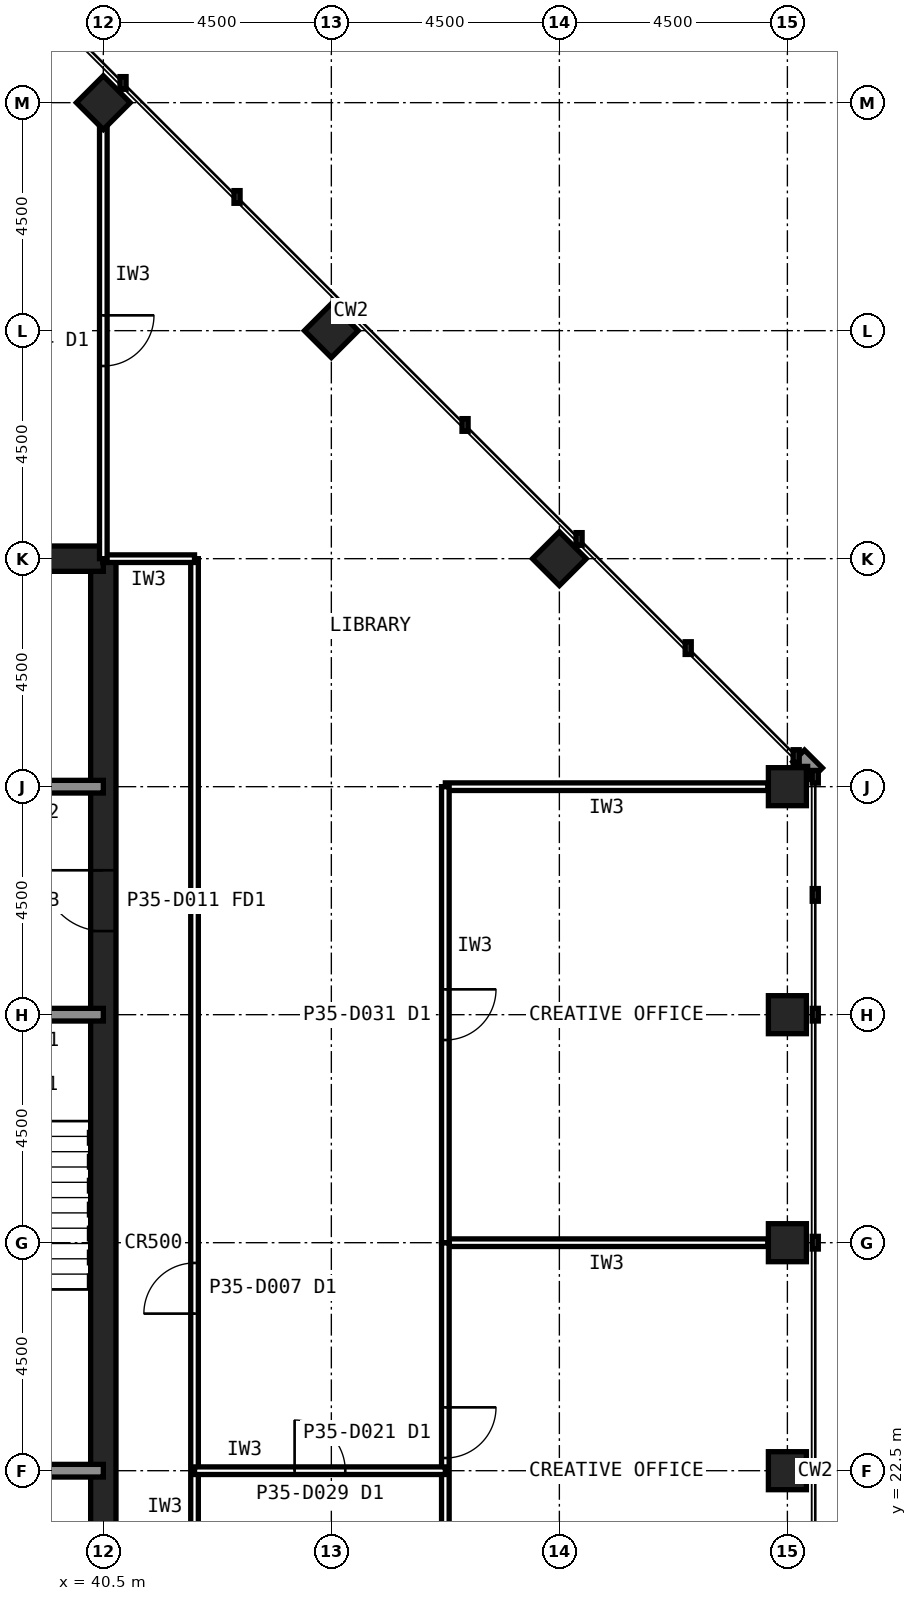
"""IFC4 building model, lengths in metres.
Left out: names, types, materials, properties, quantities, classifications, styles, units other than length and angle.
Written with IfcOpenShell. Run it as: python <this file> out.ifc"""

import sys

from ifc_helpers import new_model, si_unit, direction, frame, frame_2d, origin, origin_2d, place, context, subcontext, project, spatial, rectangle, hollow_rectangle, extrude, element, fill, save


model = new_model("IFC4")
c1 = context("Model", 3, precision=1e-05, world=origin(), true_north=direction((0.0, 1.0)))
c2 = subcontext(c1, "Body", "Model", "MODEL_VIEW")
j1 = project(units=[si_unit("LENGTHUNIT", "METRE"), si_unit("PLANEANGLEUNIT", "RADIAN")], contexts=[c1])
p1 = place(None, origin())
s1 = spatial("IfcSite", under=j1, at=p1, CompositionType="ELEMENT")
p2 = place(p1, origin())
s2 = spatial("IfcBuilding", under=s1, at=p2, CompositionType="ELEMENT")
p3 = place(p2, frame((0.0, 0.0, 151.6)))
s3 = spatial("IfcBuildingStorey", under=s2, at=p3, CompositionType="ELEMENT", Elevation=151.6)
for number, where, z_axis, x_axis in (
    (1, (54.0, 22.5, 0.0), (0.0, 0.0, 1.0), (1.0, 0.0, 0.0)),
    (2, (54.0, 27.0, 0.0), (0.0, 0.0, 1.0), (1.0, 0.0, 0.0)),
    (3, (54.0, 31.5, 0.0), (0.0, 0.0, 1.0), (1.0, 0.0, 0.0)),
    (4, (54.0, 36.0, 0.0), (0.0, 0.0, 1.0), (1.0, 0.0, 0.0)),
    (5, (49.5, 40.5, 0.0), (0.0, 0.0, 1.0), (0.707, 0.707, 0.0)),
    (6, (45.0, 45.0, 0.0), (0.0, 0.0, 1.0), (0.707, 0.707, 0.0)),
    (7, (40.5, 49.5, 0.0), (0.0, 0.0, 1.0), (0.707, 0.707, 0.0)),
):
    element("IfcColumn", number, at=place(p3, frame(where, z_axis=z_axis, x_axis=x_axis)), inside=s3, PredefinedType="COLUMN", context=c2, shape_type="SweptSolid", body=[
        extrude(hollow_rectangle(XDim=0.75, YDim=0.75, WallThickness=0.04, at=origin_2d()), origin(), (0.0, 0.0, 1.0), 4.0),
    ])
p4 = place(p3, frame((40.5, 13.5, 0.0), z_axis=(0.0, 0.0, 1.0), x_axis=(0.0, 1.0, 0.0)))
e8 = element("IfcWall", 8, at=p4, inside=s3, PredefinedType="SHEAR", context=c2, shape_type="SweptSolid", body=[
    extrude(rectangle(XDim=27.0, YDim=0.5, at=frame_2d((13.5, 0.0))), origin(), (0.0, 0.0, 1.0), 4.0),
])
p5 = place(p4, frame((5.85, 0.0, 0.0)))
e9 = element("IfcOpeningElement", 9, at=p5, cuts=e8, PredefinedType="OPENING", context=c2, shape_type="SweptSolid", body=[
    extrude(rectangle(XDim=1.8, YDim=2.1, at=frame_2d((0.9, 1.05))), frame((0.0, 0.26, 0.0), z_axis=(0.0, -1.0, 0.0), x_axis=(1.0, 0.0, 0.0)), (0.0, 0.0, 1.0), 0.52),
])
p6 = place(p4, frame((19.65, 0.0, 0.0)))
e10 = element("IfcOpeningElement", 10, at=p6, cuts=e8, PredefinedType="OPENING", context=c2, shape_type="SweptSolid", body=[
    extrude(rectangle(XDim=1.2, YDim=2.1, at=frame_2d((0.6, 1.05))), frame((0.0, 0.26, 0.0), z_axis=(0.0, -1.0, 0.0), x_axis=(1.0, 0.0, 0.0)), (0.0, 0.0, 1.0), 0.52),
])
p7 = place(p3, frame((40.5, 40.5, 0.0), z_axis=(0.0, 0.0, 1.0), x_axis=(-1.0, 0.0, 0.0)))
e11 = element("IfcWall", 11, at=p7, inside=s3, PredefinedType="SHEAR", context=c2, shape_type="SweptSolid", body=[
    extrude(rectangle(XDim=27.0, YDim=0.5, at=frame_2d((13.5, 0.0))), origin(), (0.0, 0.0, 1.0), 4.0),
])
p8 = place(p3, frame((13.5, 36.0, 0.0), z_axis=(0.0, 0.0, 1.0), x_axis=(1.0, 0.0, 0.0)))
e12 = element("IfcWall", 12, at=p8, inside=s3, PredefinedType="SOLIDWALL", context=c2, shape_type="SweptSolid", body=[
    extrude(rectangle(XDim=27.0, YDim=0.25, at=frame_2d((13.5, 0.0))), origin(), (0.0, 0.0, 1.0), 3.84),
])
p9 = place(p8, frame((1.8, 0.0, 0.0)))
e13 = element("IfcOpeningElement", 13, at=p9, cuts=e12, PredefinedType="OPENING", context=c2, shape_type="SweptSolid", body=[
    extrude(rectangle(XDim=0.9, YDim=2.1, at=frame_2d((0.45, 1.05))), frame((0.0, 0.135, 0.0), z_axis=(0.0, -1.0, 0.0), x_axis=(1.0, 0.0, 0.0)), (0.0, 0.0, 1.0), 0.27),
])
p10 = place(p8, frame((5.55, 0.0, 0.0)))
e14 = element("IfcOpeningElement", 14, at=p10, cuts=e12, PredefinedType="OPENING", context=c2, shape_type="SweptSolid", body=[
    extrude(rectangle(XDim=0.9, YDim=2.1, at=frame_2d((0.45, 1.05))), frame((0.0, 0.135, 0.0), z_axis=(0.0, -1.0, 0.0), x_axis=(1.0, 0.0, 0.0)), (0.0, 0.0, 1.0), 0.27),
])
p11 = place(p8, frame((8.55, 0.0, 0.0)))
e15 = element("IfcOpeningElement", 15, at=p11, cuts=e12, PredefinedType="OPENING", context=c2, shape_type="SweptSolid", body=[
    extrude(rectangle(XDim=0.9, YDim=2.1, at=frame_2d((0.45, 1.05))), frame((0.0, 0.135, 0.0), z_axis=(0.0, -1.0, 0.0), x_axis=(1.0, 0.0, 0.0)), (0.0, 0.0, 1.0), 0.27),
])
p12 = place(p8, frame((24.1, 0.0, 0.0)))
e16 = element("IfcOpeningElement", 16, at=p12, cuts=e12, PredefinedType="OPENING", context=c2, shape_type="SweptSolid", body=[
    extrude(rectangle(XDim=1.3, YDim=2.2, at=frame_2d((0.65, 1.1))), frame((0.0, 0.135, 0.0), z_axis=(0.0, -1.0, 0.0), x_axis=(1.0, 0.0, 0.0)), (0.0, 0.0, 1.0), 0.27),
])
p13 = place(p3, frame((13.5, 22.5, 0.0), z_axis=(0.0, 0.0, 1.0), x_axis=(1.0, 0.0, 0.0)))
e17 = element("IfcWall", 17, at=p13, inside=s3, PredefinedType="SOLIDWALL", context=c2, shape_type="SweptSolid", body=[
    extrude(rectangle(XDim=27.0, YDim=0.25, at=frame_2d((13.5, 0.0))), origin(), (0.0, 0.0, 1.0), 3.84),
])
p14 = place(p13, frame((1.65, 0.0, 0.0)))
e18 = element("IfcOpeningElement", 18, at=p14, cuts=e17, PredefinedType="OPENING", context=c2, shape_type="SweptSolid", body=[
    extrude(rectangle(XDim=1.2, YDim=2.1, at=frame_2d((0.6, 1.05))), frame((0.0, 0.135, 0.0), z_axis=(0.0, -1.0, 0.0), x_axis=(1.0, 0.0, 0.0)), (0.0, 0.0, 1.0), 0.27),
])
p15 = place(p13, frame((6.025, 0.0, 0.0)))
e19 = element("IfcOpeningElement", 19, at=p15, cuts=e17, PredefinedType="OPENING", context=c2, shape_type="SweptSolid", body=[
    extrude(rectangle(XDim=1.0, YDim=2.1, at=frame_2d((0.5, 1.05))), frame((0.0, 0.135, 0.0), z_axis=(0.0, -1.0, 0.0), x_axis=(1.0, 0.0, 0.0)), (0.0, 0.0, 1.0), 0.27),
])
p16 = place(p13, frame((10.525, 0.0, 0.0)))
e20 = element("IfcOpeningElement", 20, at=p16, cuts=e17, PredefinedType="OPENING", context=c2, shape_type="SweptSolid", body=[
    extrude(rectangle(XDim=1.0, YDim=2.1, at=frame_2d((0.5, 1.05))), frame((0.0, 0.135, 0.0), z_axis=(0.0, -1.0, 0.0), x_axis=(1.0, 0.0, 0.0)), (0.0, 0.0, 1.0), 0.27),
])
p17 = place(p13, frame((19.75, 0.0, 0.0)))
e21 = element("IfcOpeningElement", 21, at=p17, cuts=e17, PredefinedType="OPENING", context=c2, shape_type="SweptSolid", body=[
    extrude(rectangle(XDim=1.0, YDim=2.1, at=frame_2d((0.5, 1.05))), frame((0.0, 0.135, 0.0), z_axis=(0.0, -1.0, 0.0), x_axis=(1.0, 0.0, 0.0)), (0.0, 0.0, 1.0), 0.27),
])
p18 = place(p13, frame((15.05, 0.0, 0.0)))
e22 = element("IfcOpeningElement", 22, at=p18, cuts=e17, PredefinedType="OPENING", context=c2, shape_type="SweptSolid", body=[
    extrude(rectangle(XDim=1.4, YDim=2.4, at=frame_2d((0.7, 1.2))), frame((0.0, 0.135, 0.0), z_axis=(0.0, -1.0, 0.0), x_axis=(1.0, 0.0, 0.0)), (0.0, 0.0, 1.0), 0.27),
])
p19 = place(p3, frame((13.5, 31.5, 0.0), z_axis=(0.0, 0.0, 1.0), x_axis=(1.0, 0.0, 0.0)))
e23 = element("IfcWall", 23, at=p19, inside=s3, PredefinedType="SOLIDWALL", context=c2, shape_type="SweptSolid", body=[
    extrude(rectangle(XDim=27.0, YDim=0.25, at=frame_2d((13.5, 0.0))), origin(), (0.0, 0.0, 1.0), 3.84),
])
p20 = place(p19, frame((24.15, 0.0, 0.0)))
e24 = element("IfcOpeningElement", 24, at=p20, cuts=e23, PredefinedType="OPENING", context=c2, shape_type="SweptSolid", body=[
    extrude(rectangle(XDim=1.2, YDim=2.1, at=frame_2d((0.6, 1.05))), frame((0.0, 0.135, 0.0), z_axis=(0.0, -1.0, 0.0), x_axis=(1.0, 0.0, 0.0)), (0.0, 0.0, 1.0), 0.27),
])
p21 = place(p19, frame((15.3, 0.0, 0.0)))
e25 = element("IfcOpeningElement", 25, at=p21, cuts=e23, PredefinedType="OPENING", context=c2, shape_type="SweptSolid", body=[
    extrude(rectangle(XDim=0.9, YDim=2.1, at=frame_2d((0.45, 1.05))), frame((0.0, 0.135, 0.0), z_axis=(0.0, -1.0, 0.0), x_axis=(1.0, 0.0, 0.0)), (0.0, 0.0, 1.0), 0.27),
])
p22 = place(p19, frame((19.8, 0.0, 0.0)))
e26 = element("IfcOpeningElement", 26, at=p22, cuts=e23, PredefinedType="OPENING", context=c2, shape_type="SweptSolid", body=[
    extrude(rectangle(XDim=0.9, YDim=2.1, at=frame_2d((0.45, 1.05))), frame((0.0, 0.135, 0.0), z_axis=(0.0, -1.0, 0.0), x_axis=(1.0, 0.0, 0.0)), (0.0, 0.0, 1.0), 0.27),
])
p23 = place(p3, frame((42.3, 11.7, 0.0), z_axis=(0.0, 0.0, 1.0), x_axis=(0.0, 1.0, 0.0)))
e27 = element("IfcWall", 27, at=p23, inside=s3, PredefinedType="PARTITIONING", context=c2, shape_type="SweptSolid", body=[
    extrude(rectangle(XDim=28.8, YDim=0.15, at=frame_2d((14.4, 0.0))), origin(), (0.0, 0.0, 1.0), 3.84),
])
p24 = place(p23, frame((13.9, 0.0, 0.0)))
e28 = element("IfcOpeningElement", 28, at=p24, cuts=e27, PredefinedType="OPENING", context=c2, shape_type="SweptSolid", body=[
    extrude(rectangle(XDim=1.0, YDim=2.1, at=frame_2d((0.5, 1.05))), frame((0.0, 0.085, 0.0), z_axis=(0.0, -1.0, 0.0), x_axis=(1.0, 0.0, 0.0)), (0.0, 0.0, 1.0), 0.17),
])
p25 = place(p3, frame((42.3, 40.5, 0.0), z_axis=(0.0, 0.0, 1.0), x_axis=(-1.0, 0.0, 0.0)))
e29 = element("IfcWall", 29, at=p25, inside=s3, PredefinedType="PARTITIONING", context=c2, shape_type="SweptSolid", body=[
    extrude(rectangle(XDim=1.81, YDim=0.15, at=frame_2d((0.905, 0.0))), origin(), (0.0, 0.0, 1.0), 2.989),
])
p26 = place(p3, frame((53.615, 27.0, 0.0), z_axis=(0.0, 0.0, 1.0), x_axis=(-1.0, 0.0, 0.0)))
e30 = element("IfcWall", 30, at=p26, inside=s3, PredefinedType="PARTITIONING", context=c2, shape_type="SweptSolid", body=[
    extrude(rectangle(XDim=6.365, YDim=0.15, at=frame_2d((3.183, 0.0))), origin(), (0.0, 0.0, 1.0), 2.989),
])
p27 = place(p3, frame((47.25, 27.0, 0.0), z_axis=(0.0, 0.0, 1.0), x_axis=(0.0, -1.0, 0.0)))
e31 = element("IfcWall", 31, at=p27, inside=s3, PredefinedType="PARTITIONING", context=c2, shape_type="SweptSolid", body=[
    extrude(rectangle(XDim=9.0, YDim=0.15, at=frame_2d((4.5, 0.0))), origin(), (0.0, 0.0, 1.0), 3.84),
])
p28 = place(p27, frame((3.25, 0.0, 0.0)))
e32 = element("IfcOpeningElement", 32, at=p28, cuts=e31, PredefinedType="OPENING", context=c2, shape_type="SweptSolid", body=[
    extrude(rectangle(XDim=1.0, YDim=2.1, at=frame_2d((0.5, 1.05))), frame((0.0, 0.085, 0.0), z_axis=(0.0, -1.0, 0.0), x_axis=(1.0, 0.0, 0.0)), (0.0, 0.0, 1.0), 0.17),
])
p29 = place(p3, frame((53.615, 36.0, 0.0), z_axis=(0.0, 0.0, 1.0), x_axis=(-1.0, 0.0, 0.0)))
e33 = element("IfcWall", 33, at=p29, inside=s3, PredefinedType="PARTITIONING", context=c2, shape_type="SweptSolid", body=[
    extrude(rectangle(XDim=6.365, YDim=0.15, at=frame_2d((3.183, 0.0))), origin(), (0.0, 0.0, 1.0), 2.989),
])
p30 = place(p3, frame((47.25, 36.0, 0.0), z_axis=(0.0, 0.0, 1.0), x_axis=(0.0, -1.0, 0.0)))
e34 = element("IfcWall", 34, at=p30, inside=s3, PredefinedType="PARTITIONING", context=c2, shape_type="SweptSolid", body=[
    extrude(rectangle(XDim=9.0, YDim=0.15, at=frame_2d((4.5, 0.0))), origin(), (0.0, 0.0, 1.0), 3.84),
])
p31 = place(p30, frame((4.0, 0.0, 0.0)))
e35 = element("IfcOpeningElement", 35, at=p31, cuts=e34, PredefinedType="OPENING", context=c2, shape_type="SweptSolid", body=[
    extrude(rectangle(XDim=1.0, YDim=2.1, at=frame_2d((0.5, 1.05))), frame((0.0, 0.085, 0.0), z_axis=(0.0, -1.0, 0.0), x_axis=(1.0, 0.0, 0.0)), (0.0, 0.0, 1.0), 0.17),
])
p32 = place(p3, frame((40.5, 49.105, 0.0), z_axis=(0.0, 0.0, 1.0), x_axis=(0.0, -1.0, 0.0)))
e36 = element("IfcWall", 36, at=p32, inside=s3, PredefinedType="PARTITIONING", context=c2, shape_type="SweptSolid", body=[
    extrude(rectangle(XDim=8.605, YDim=0.15, at=frame_2d((4.302, 0.0))), origin(), (0.0, 0.0, 1.0), 2.989),
])
p33 = place(p32, frame((3.802, 0.0, 0.0)))
e37 = element("IfcOpeningElement", 37, at=p33, cuts=e36, PredefinedType="OPENING", context=c2, shape_type="SweptSolid", body=[
    extrude(rectangle(XDim=1.0, YDim=2.1, at=frame_2d((0.5, 1.05))), frame((0.0, 0.085, 0.0), z_axis=(0.0, -1.0, 0.0), x_axis=(1.0, 0.0, 0.0)), (0.0, 0.0, 1.0), 0.17),
])
p34 = place(p3, frame((42.3, 22.5, 0.0), z_axis=(0.0, 0.0, 1.0), x_axis=(1.0, 0.0, 0.0)))
e38 = element("IfcWall", 38, at=p34, inside=s3, PredefinedType="PARTITIONING", context=c2, shape_type="SweptSolid", body=[
    extrude(rectangle(XDim=4.95, YDim=0.15, at=frame_2d((2.475, 0.0))), origin(), (0.0, 0.0, 1.0), 2.989),
])
p35 = place(p34, frame((1.975, 0.0, 0.0)))
e39 = element("IfcOpeningElement", 39, at=p35, cuts=e38, PredefinedType="OPENING", context=c2, shape_type="SweptSolid", body=[
    extrude(rectangle(XDim=1.0, YDim=2.1, at=frame_2d((0.5, 1.05))), frame((0.0, 0.085, 0.0), z_axis=(0.0, -1.0, 0.0), x_axis=(1.0, 0.0, 0.0)), (0.0, 0.0, 1.0), 0.17),
])
p36 = place(p6, origin())
e40 = element("IfcDoor", 40, at=p36, inside=s3, OperationType="SINGLE_SWING_RIGHT", PredefinedType="DOOR", context=c2, shape_type="SweptSolid", body=[
    extrude(rectangle(XDim=1.2, YDim=2.1, at=frame_2d((0.6, 1.05))), frame((0.0, 0.025, 0.0), z_axis=(0.0, -1.0, 0.0), x_axis=(1.0, 0.0, 0.0)), (0.0, 0.0, 1.0), 0.05),
])
fill(e10, e40)
p37 = place(p24, origin())
e41 = element("IfcDoor", 41, at=p37, inside=s3, OperationType="SINGLE_SWING_LEFT", PredefinedType="DOOR", context=c2, shape_type="SweptSolid", body=[
    extrude(rectangle(XDim=1.0, YDim=2.1, at=frame_2d((0.5, 1.05))), frame((0.0, 0.025, 0.0), z_axis=(0.0, -1.0, 0.0), x_axis=(1.0, 0.0, 0.0)), (0.0, 0.0, 1.0), 0.05),
])
fill(e28, e41)
p38 = place(p28, origin())
e42 = element("IfcDoor", 42, at=p38, inside=s3, OperationType="SINGLE_SWING_LEFT", PredefinedType="DOOR", context=c2, shape_type="SweptSolid", body=[
    extrude(rectangle(XDim=1.0, YDim=2.1, at=frame_2d((0.5, 1.05))), frame((0.0, 0.025, 0.0), z_axis=(0.0, -1.0, 0.0), x_axis=(1.0, 0.0, 0.0)), (0.0, 0.0, 1.0), 0.05),
])
fill(e32, e42)
p39 = place(p31, origin())
e43 = element("IfcDoor", 43, at=p39, inside=s3, OperationType="SINGLE_SWING_LEFT", PredefinedType="DOOR", context=c2, shape_type="SweptSolid", body=[
    extrude(rectangle(XDim=1.0, YDim=2.1, at=frame_2d((0.5, 1.05))), frame((0.0, 0.025, 0.0), z_axis=(0.0, -1.0, 0.0), x_axis=(1.0, 0.0, 0.0)), (0.0, 0.0, 1.0), 0.05),
])
fill(e35, e43)
p40 = place(p33, origin())
e44 = element("IfcDoor", 44, at=p40, inside=s3, OperationType="SINGLE_SWING_LEFT", PredefinedType="DOOR", context=c2, shape_type="SweptSolid", body=[
    extrude(rectangle(XDim=1.0, YDim=2.1, at=frame_2d((0.5, 1.05))), frame((0.0, 0.025, 0.0), z_axis=(0.0, -1.0, 0.0), x_axis=(1.0, 0.0, 0.0)), (0.0, 0.0, 1.0), 0.05),
])
fill(e37, e44)
p41 = place(p35, origin())
e45 = element("IfcDoor", 45, at=p41, inside=s3, OperationType="SINGLE_SWING_LEFT", PredefinedType="DOOR", context=c2, shape_type="SweptSolid", body=[
    extrude(rectangle(XDim=1.0, YDim=2.1, at=frame_2d((0.5, 1.05))), frame((0.0, 0.025, 0.0), z_axis=(0.0, -1.0, 0.0), x_axis=(1.0, 0.0, 0.0)), (0.0, 0.0, 1.0), 0.05),
])
fill(e39, e45)
save(model, sys.argv[1])
